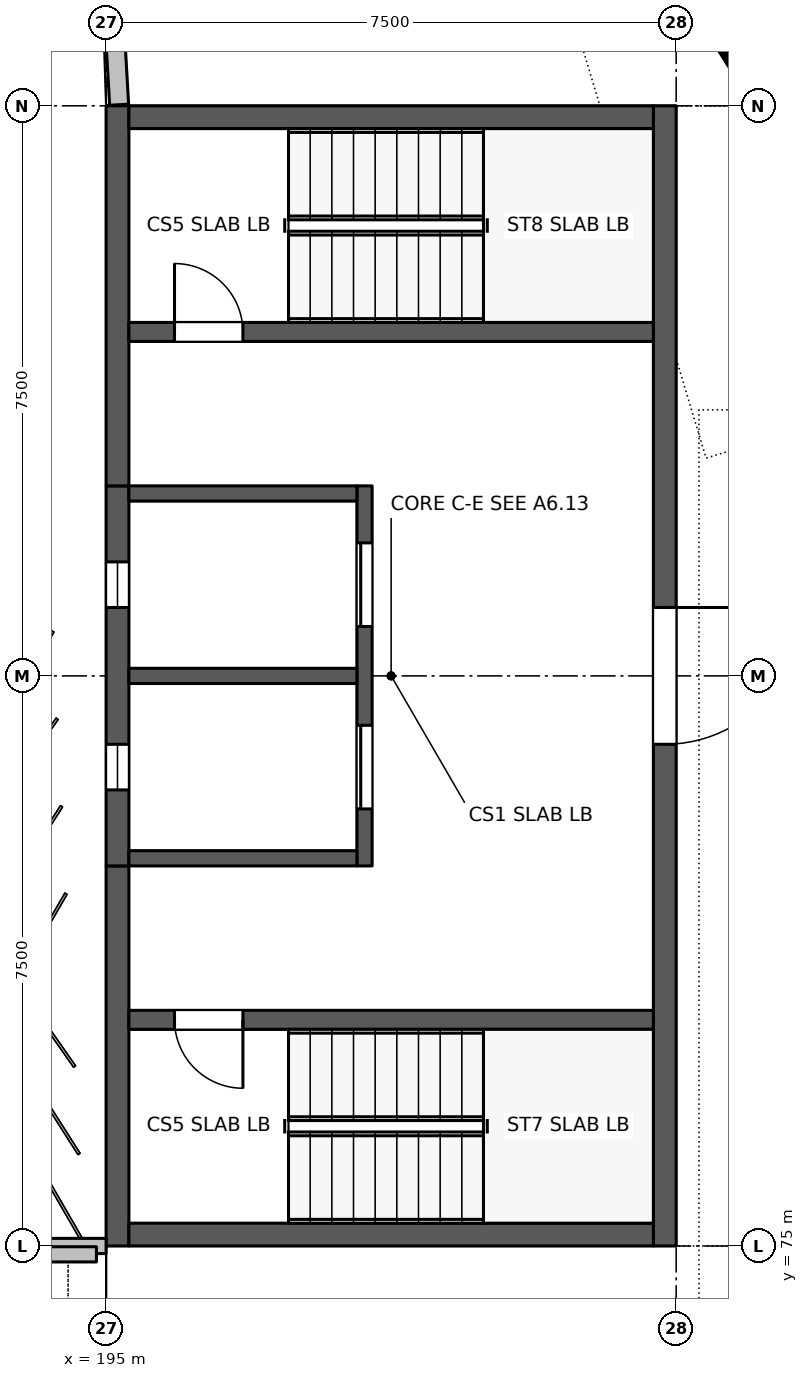
"""IFC4 building model, lengths in metres.
Left out: names, types, materials, properties, quantities, classifications, styles, units other than length and angle.
Written with IfcOpenShell. Run it as: python <this file> out.ifc"""

import sys

from ifc_helpers import new_model, si_unit, direction, frame, frame_2d, origin, place, context, subcontext, project, spatial, rectangle, extrude, element, fill, save


model = new_model("IFC4")
c1 = context("Model", 3, precision=1e-05, world=origin(), true_north=direction((0.0, 1.0)))
c2 = subcontext(c1, "Body", "Model", "MODEL_VIEW")
j1 = project(units=[si_unit("LENGTHUNIT", "METRE"), si_unit("PLANEANGLEUNIT", "RADIAN")], contexts=[c1])
p1 = place(None, origin())
s1 = spatial("IfcSite", under=j1, at=p1, CompositionType="ELEMENT")
p2 = place(p1, origin())
s2 = spatial("IfcBuilding", under=s1, at=p2, CompositionType="ELEMENT")
p3 = place(p2, frame((0.0, 0.0, 9.9)))
s3 = spatial("IfcBuildingStorey", under=s2, at=p3, CompositionType="ELEMENT", Elevation=9.9)
p4 = place(p3, frame((195.037, 92.356, 0.0), z_axis=(0.0, 0.0, 1.0), x_axis=(0.057361082086, -0.998353497646, 0.0)))
e1 = element("IfcWall", 1, at=p4, inside=s3, PredefinedType="SOLIDWALL", context=c2, shape_type="SweptSolid", body=[
    extrude(rectangle(XDim=2.345, YDim=0.25, at=frame_2d((1.173, 0.0))), origin(), (0.0, 0.0, 1.0), 1.1),
])
p5 = place(p3, frame((187.654, 75.0, 0.0), z_axis=(0.0, 0.0, 1.0), x_axis=(1.0, 0.0, 0.0)))
e2 = element("IfcWall", 2, at=p5, inside=s3, PredefinedType="SOLIDWALL", context=c2, shape_type="SweptSolid", body=[
    extrude(rectangle(XDim=7.346, YDim=0.2, at=frame_2d((3.673, 0.0))), origin(), (0.0, 0.0, 1.0), 2.627),
])
p6 = place(p5, frame((0.849, 0.0, 0.9)))
e3 = element("IfcOpeningElement", 3, at=p6, cuts=e2, PredefinedType="OPENING", context=c2, shape_type="SweptSolid", body=[
    extrude(rectangle(XDim=2.4, YDim=1.5, at=frame_2d((1.2, 0.75))), frame((0.0, 0.11, 0.0), z_axis=(0.0, -1.0, 0.0), x_axis=(1.0, 0.0, 0.0)), (0.0, 0.0, 1.0), 0.22),
])
p7 = place(p5, frame((4.098, 0.0, 0.9)))
e4 = element("IfcOpeningElement", 4, at=p7, cuts=e2, PredefinedType="OPENING", context=c2, shape_type="SweptSolid", body=[
    extrude(rectangle(XDim=2.4, YDim=1.5, at=frame_2d((1.2, 0.75))), frame((0.0, 0.11, 0.0), z_axis=(0.0, -1.0, 0.0), x_axis=(1.0, 0.0, 0.0)), (0.0, 0.0, 1.0), 0.22),
])
p8 = place(p3, frame((187.654, 74.89, 3.16), z_axis=(0.0, 0.0, 1.0), x_axis=(1.0, 0.0, 0.0)))
e5 = element("IfcWall", 5, at=p8, inside=s3, PredefinedType="SOLIDWALL", context=c2, shape_type="SweptSolid", body=[
    extrude(rectangle(XDim=7.219, YDim=0.2, at=frame_2d((3.61, 0.0))), origin(), (0.0, 0.0, 1.0), 4.514),
])
p9 = place(p8, frame((0.455, 0.0, 1.1)))
e6 = element("IfcOpeningElement", 6, at=p9, cuts=e5, PredefinedType="OPENING", context=c2, shape_type="SweptSolid", body=[
    extrude(rectangle(XDim=1.8, YDim=1.4, at=frame_2d((0.9, 0.7))), frame((0.0, 0.11, 0.0), z_axis=(0.0, -1.0, 0.0), x_axis=(1.0, 0.0, 0.0)), (0.0, 0.0, 1.0), 0.22),
])
p10 = place(p8, frame((2.71, 0.0, 1.1)))
e7 = element("IfcOpeningElement", 7, at=p10, cuts=e5, PredefinedType="OPENING", context=c2, shape_type="SweptSolid", body=[
    extrude(rectangle(XDim=1.8, YDim=1.4, at=frame_2d((0.9, 0.7))), frame((0.0, 0.11, 0.0), z_axis=(0.0, -1.0, 0.0), x_axis=(1.0, 0.0, 0.0)), (0.0, 0.0, 1.0), 0.22),
])
p11 = place(p8, frame((4.965, 0.0, 1.1)))
e8 = element("IfcOpeningElement", 8, at=p11, cuts=e5, PredefinedType="OPENING", context=c2, shape_type="SweptSolid", body=[
    extrude(rectangle(XDim=1.8, YDim=1.4, at=frame_2d((0.9, 0.7))), frame((0.0, 0.11, 0.0), z_axis=(0.0, -1.0, 0.0), x_axis=(1.0, 0.0, 0.0)), (0.0, 0.0, 1.0), 0.22),
])
p12 = place(p3, frame((202.35, 90.0, 0.0), z_axis=(0.0, 0.0, 1.0), x_axis=(0.0, -1.0, 0.0)))
e9 = element("IfcWall", 9, at=p12, inside=s3, PredefinedType="SHEAR", context=c2, shape_type="SweptSolid", body=[
    extrude(rectangle(XDim=15.0, YDim=0.3, at=frame_2d((7.5, 0.0))), origin(), (0.0, 0.0, 1.0), 3.3),
])
p13 = place(p12, frame((6.6, 0.0, 0.0)))
e10 = element("IfcOpeningElement", 10, at=p13, cuts=e9, PredefinedType="OPENING", context=c2, shape_type="SweptSolid", body=[
    extrude(rectangle(XDim=1.8, YDim=2.1, at=frame_2d((0.9, 1.05))), frame((0.0, 0.16, 0.0), z_axis=(0.0, -1.0, 0.0), x_axis=(1.0, 0.0, 0.0)), (0.0, 0.0, 1.0), 0.32),
])
p14 = place(p3, frame((195.15, 75.0, 0.0), z_axis=(0.0, 0.0, 1.0), x_axis=(0.0, 1.0, 0.0)))
e11 = element("IfcWall", 11, at=p14, inside=s3, PredefinedType="SHEAR", context=c2, shape_type="SweptSolid", body=[
    extrude(rectangle(XDim=5.0, YDim=0.3, at=frame_2d((2.5, 0.0))), origin(), (0.0, 0.0, 1.0), 3.3),
])
p15 = place(p3, frame((195.15, 80.0, 0.0), z_axis=(0.0, 0.0, 1.0), x_axis=(0.0, 1.0, 0.0)))
e12 = element("IfcWall", 12, at=p15, inside=s3, PredefinedType="SHEAR", context=c2, shape_type="SweptSolid", body=[
    extrude(rectangle(XDim=5.0, YDim=0.3, at=frame_2d((2.5, 0.0))), origin(), (0.0, 0.0, 1.0), 3.3),
])
p16 = place(p15, frame((1.0, 0.0, 0.3)))
e13 = element("IfcOpeningElement", 13, at=p16, cuts=e12, PredefinedType="OPENING", context=c2, shape_type="SweptSolid", body=[
    extrude(rectangle(XDim=0.6, YDim=2.7, at=frame_2d((0.3, 1.35))), frame((0.0, 0.16, 0.0), z_axis=(0.0, -1.0, 0.0), x_axis=(1.0, 0.0, 0.0)), (0.0, 0.0, 1.0), 0.32),
])
p17 = place(p15, frame((3.4, 0.0, 0.3)))
e14 = element("IfcOpeningElement", 14, at=p17, cuts=e12, PredefinedType="OPENING", context=c2, shape_type="SweptSolid", body=[
    extrude(rectangle(XDim=0.6, YDim=2.7, at=frame_2d((0.3, 1.35))), frame((0.0, 0.16, 0.0), z_axis=(0.0, -1.0, 0.0), x_axis=(1.0, 0.0, 0.0)), (0.0, 0.0, 1.0), 0.32),
])
p18 = place(p3, frame((195.15, 85.0, 0.0), z_axis=(0.0, 0.0, 1.0), x_axis=(0.0, 1.0, 0.0)))
e15 = element("IfcWall", 15, at=p18, inside=s3, PredefinedType="SHEAR", context=c2, shape_type="SweptSolid", body=[
    extrude(rectangle(XDim=5.0, YDim=0.3, at=frame_2d((2.5, 0.0))), origin(), (0.0, 0.0, 1.0), 3.3),
])
for number, where, z_axis, x_axis in (
    (16, (202.2, 75.15, 0.0), (0.0, 0.0, 1.0), (-1.0, 0.0, 0.0)),
    (17, (202.2, 89.85, 0.0), (0.0, 0.0, 1.0), (-1.0, 0.0, 0.0)),
):
    element("IfcWall", number, at=place(p3, frame(where, z_axis=z_axis, x_axis=x_axis)), inside=s3, PredefinedType="SHEAR", context=c2, shape_type="SweptSolid", body=[
        extrude(rectangle(XDim=6.9, YDim=0.3, at=frame_2d((3.45, 0.0))), origin(), (0.0, 0.0, 1.0), 3.3),
    ])
p19 = place(p3, frame((202.2, 77.975, 0.0), z_axis=(0.0, 0.0, 1.0), x_axis=(-1.0, 0.0, 0.0)))
e18 = element("IfcWall", 18, at=p19, inside=s3, PredefinedType="STANDARD", context=c2, shape_type="SweptSolid", body=[
    extrude(rectangle(XDim=6.9, YDim=0.25, at=frame_2d((3.45, 0.0))), origin(), (0.0, 0.0, 1.0), 3.1),
])
p20 = place(p19, frame((5.4, 0.0, 0.0)))
e19 = element("IfcOpeningElement", 19, at=p20, cuts=e18, PredefinedType="OPENING", context=c2, shape_type="SweptSolid", body=[
    extrude(rectangle(XDim=0.9, YDim=2.1, at=frame_2d((0.45, 1.05))), frame((0.0, 0.135, 0.0), z_axis=(0.0, -1.0, 0.0), x_axis=(1.0, 0.0, 0.0)), (0.0, 0.0, 1.0), 0.27),
])
p21 = place(p3, frame((195.3, 87.025, 0.0), z_axis=(0.0, 0.0, 1.0), x_axis=(1.0, 0.0, 0.0)))
e20 = element("IfcWall", 20, at=p21, inside=s3, PredefinedType="STANDARD", context=c2, shape_type="SweptSolid", body=[
    extrude(rectangle(XDim=6.9, YDim=0.25, at=frame_2d((3.45, 0.0))), origin(), (0.0, 0.0, 1.0), 3.1),
])
p22 = place(p21, frame((0.6, 0.0, 0.0)))
e21 = element("IfcOpeningElement", 21, at=p22, cuts=e20, PredefinedType="OPENING", context=c2, shape_type="SweptSolid", body=[
    extrude(rectangle(XDim=0.9, YDim=2.1, at=frame_2d((0.45, 1.05))), frame((0.0, 0.135, 0.0), z_axis=(0.0, -1.0, 0.0), x_axis=(1.0, 0.0, 0.0)), (0.0, 0.0, 1.0), 0.27),
])
p23 = place(p3, frame((198.4, 80.0, 0.0), z_axis=(0.0, 0.0, 1.0), x_axis=(0.0, 1.0, 0.0)))
e22 = element("IfcWall", 22, at=p23, inside=s3, PredefinedType="STANDARD", context=c2, shape_type="SweptSolid", body=[
    extrude(rectangle(XDim=5.0, YDim=0.2, at=frame_2d((2.5, 0.0))), origin(), (0.0, 0.0, 1.0), 3.1),
])
p24 = place(p23, frame((0.75, 0.0, 0.0)))
e23 = element("IfcOpeningElement", 23, at=p24, cuts=e22, PredefinedType="OPENING", context=c2, shape_type="SweptSolid", body=[
    extrude(rectangle(XDim=1.1, YDim=2.1, at=frame_2d((0.55, 1.05))), frame((0.0, 0.11, 0.0), z_axis=(0.0, -1.0, 0.0), x_axis=(1.0, 0.0, 0.0)), (0.0, 0.0, 1.0), 0.22),
])
p25 = place(p23, frame((3.15, 0.0, 0.0)))
e24 = element("IfcOpeningElement", 24, at=p25, cuts=e22, PredefinedType="OPENING", context=c2, shape_type="SweptSolid", body=[
    extrude(rectangle(XDim=1.1, YDim=2.1, at=frame_2d((0.55, 1.05))), frame((0.0, 0.11, 0.0), z_axis=(0.0, -1.0, 0.0), x_axis=(1.0, 0.0, 0.0)), (0.0, 0.0, 1.0), 0.22),
])
for number, where, z_axis, x_axis in (
    (25, (198.3, 80.1, 0.0), (0.0, 0.0, 1.0), (-1.0, 0.0, 0.0)),
    (26, (198.3, 82.5, 0.0), (0.0, 0.0, 1.0), (-1.0, 0.0, 0.0)),
    (27, (198.3, 84.9, 0.0), (0.0, 0.0, 1.0), (-1.0, 0.0, 0.0)),
):
    element("IfcWall", number, at=place(p3, frame(where, z_axis=z_axis, x_axis=x_axis)), inside=s3, PredefinedType="STANDARD", context=c2, shape_type="SweptSolid", body=[
        extrude(rectangle(XDim=3.0, YDim=0.2, at=frame_2d((1.5, 0.0))), origin(), (0.0, 0.0, 1.0), 3.1),
    ])
p26 = place(p13, origin())
e28 = element("IfcDoor", 28, at=p26, inside=s3, OperationType="DOUBLE_DOOR_SINGLE_SWING", PredefinedType="DOOR", context=c2, shape_type="SweptSolid", body=[
    extrude(rectangle(XDim=1.8, YDim=2.1, at=frame_2d((0.9, 1.05))), frame((0.0, 0.025, 0.0), z_axis=(0.0, -1.0, 0.0), x_axis=(1.0, 0.0, 0.0)), (0.0, 0.0, 1.0), 0.05),
])
fill(e10, e28)
p27 = place(p20, origin())
e29 = element("IfcDoor", 29, at=p27, inside=s3, OperationType="SINGLE_SWING_LEFT", PredefinedType="DOOR", context=c2, shape_type="SweptSolid", body=[
    extrude(rectangle(XDim=0.9, YDim=2.1, at=frame_2d((0.45, 1.05))), frame((0.0, 0.025, 0.0), z_axis=(0.0, -1.0, 0.0), x_axis=(1.0, 0.0, 0.0)), (0.0, 0.0, 1.0), 0.05),
])
fill(e19, e29)
p28 = place(p22, origin())
e30 = element("IfcDoor", 30, at=p28, inside=s3, OperationType="SINGLE_SWING_RIGHT", PredefinedType="DOOR", context=c2, shape_type="SweptSolid", body=[
    extrude(rectangle(XDim=0.9, YDim=2.1, at=frame_2d((0.45, 1.05))), frame((0.0, 0.025, 0.0), z_axis=(0.0, -1.0, 0.0), x_axis=(1.0, 0.0, 0.0)), (0.0, 0.0, 1.0), 0.05),
])
fill(e21, e30)
p29 = place(p24, origin())
e31 = element("IfcDoor", 31, at=p29, inside=s3, OperationType="DOUBLE_DOOR_SLIDING", PredefinedType="DOOR", context=c2, shape_type="SweptSolid", body=[
    extrude(rectangle(XDim=1.1, YDim=2.1, at=frame_2d((0.55, 1.05))), frame((0.0, 0.025, 0.0), z_axis=(0.0, -1.0, 0.0), x_axis=(1.0, 0.0, 0.0)), (0.0, 0.0, 1.0), 0.05),
])
fill(e23, e31)
p30 = place(p25, origin())
e32 = element("IfcDoor", 32, at=p30, inside=s3, OperationType="DOUBLE_DOOR_SLIDING", PredefinedType="DOOR", context=c2, shape_type="SweptSolid", body=[
    extrude(rectangle(XDim=1.1, YDim=2.1, at=frame_2d((0.55, 1.05))), frame((0.0, 0.025, 0.0), z_axis=(0.0, -1.0, 0.0), x_axis=(1.0, 0.0, 0.0)), (0.0, 0.0, 1.0), 0.05),
])
fill(e24, e32)
p31 = place(p16, origin())
e33 = element("IfcWindow", 33, at=p31, inside=s3, PartitioningType="SINGLE_PANEL", PredefinedType="WINDOW", context=c2, shape_type="SweptSolid", body=[
    extrude(rectangle(XDim=0.6, YDim=2.7, at=frame_2d((0.3, 1.35))), frame((0.0, 0.03, 0.0), z_axis=(0.0, -1.0, 0.0), x_axis=(1.0, 0.0, 0.0)), (0.0, 0.0, 1.0), 0.06),
])
fill(e13, e33)
p32 = place(p17, origin())
e34 = element("IfcWindow", 34, at=p32, inside=s3, PartitioningType="SINGLE_PANEL", PredefinedType="WINDOW", context=c2, shape_type="SweptSolid", body=[
    extrude(rectangle(XDim=0.6, YDim=2.7, at=frame_2d((0.3, 1.35))), frame((0.0, 0.03, 0.0), z_axis=(0.0, -1.0, 0.0), x_axis=(1.0, 0.0, 0.0)), (0.0, 0.0, 1.0), 0.06),
])
fill(e14, e34)
save(model, sys.argv[1])
